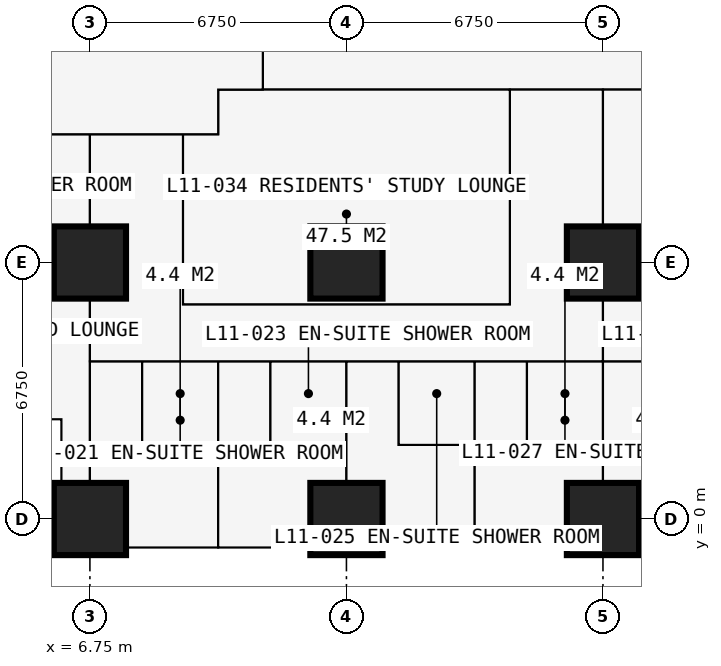
"""IFC4 building model, lengths in metres.
Left out: names, types, materials, properties, quantities, classifications, styles, units other than length and angle.
Written with IfcOpenShell. Run it as: python <this file> out.ifc"""

import sys

from ifc_helpers import new_model, si_unit, direction, frame, frame_2d, origin, origin_2d, place, context, subcontext, project, spatial, rectangle, extrude, element, fill, save


model = new_model("IFC4")
c1 = context("Model", 3, precision=1e-05, world=origin(), true_north=direction((0.0, 1.0)))
c2 = subcontext(c1, "Body", "Model", "MODEL_VIEW")
j1 = project(units=[si_unit("LENGTHUNIT", "METRE"), si_unit("PLANEANGLEUNIT", "RADIAN")], contexts=[c1])
p1 = place(None, origin())
s1 = spatial("IfcSite", under=j1, at=p1, CompositionType="ELEMENT")
p2 = place(p1, origin())
s2 = spatial("IfcBuilding", under=s1, at=p2, CompositionType="ELEMENT")
p3 = place(p2, frame((0.0, 0.0, 43.2)))
s3 = spatial("IfcBuildingStorey", under=s2, at=p3, CompositionType="ELEMENT", Elevation=43.2)
for number, where, z_axis, x_axis in (
    (1, (6.75, 0.0, 0.0), (0.0, 0.0, 1.0), (1.0, 0.0, 0.0)),
    (2, (6.75, 6.75, 0.0), (0.0, 0.0, 1.0), (1.0, 0.0, 0.0)),
    (3, (13.5, 0.0, 0.0), (0.0, 0.0, 1.0), (1.0, 0.0, 0.0)),
    (4, (13.5, 6.75, 0.0), (0.0, 0.0, 1.0), (1.0, 0.0, 0.0)),
    (5, (20.25, 0.0, 0.0), (0.0, 0.0, 1.0), (1.0, 0.0, 0.0)),
    (6, (20.25, 6.75, 0.0), (0.0, 0.0, 1.0), (1.0, 0.0, 0.0)),
):
    element("IfcColumn", number, at=place(p3, frame(where, z_axis=z_axis, x_axis=x_axis)), inside=s3, PredefinedType="COLUMN", context=c2, shape_type="SweptSolid", body=[
        extrude(rectangle(XDim=1.9, YDim=1.9, at=origin_2d()), origin(), (0.0, 0.0, 1.0), 3.6),
    ])
p4 = place(p3, frame((2.625, 2.625, 0.0), z_axis=(0.0, 0.0, 1.0), x_axis=(1.0, 0.0, 0.0)))
e7 = element("IfcWall", 7, at=p4, inside=s3, PredefinedType="SOLIDWALL", context=c2, shape_type="SweptSolid", body=[
    extrude(rectangle(XDim=3.375, YDim=0.3, at=frame_2d((1.688, 0.0))), origin(), (0.0, 0.0, 1.0), 3.375),
])
p5 = place(p4, frame((0.788, 0.0, 0.6)))
e8 = element("IfcOpeningElement", 8, at=p5, cuts=e7, PredefinedType="OPENING", context=c2, shape_type="SweptSolid", body=[
    extrude(rectangle(XDim=1.8, YDim=2.1, at=frame_2d((0.9, 1.05))), frame((0.0, 0.16, 0.0), z_axis=(0.0, -1.0, 0.0), x_axis=(1.0, 0.0, 0.0)), (0.0, 0.0, 1.0), 0.32),
])
p6 = place(p3, frame((6.0, 2.625, 0.0), z_axis=(0.0, 0.0, 1.0), x_axis=(0.0, -1.0, 0.0)))
e9 = element("IfcWall", 9, at=p6, inside=s3, PredefinedType="SOLIDWALL", context=c2, shape_type="SweptSolid", body=[
    extrude(rectangle(XDim=3.375, YDim=0.3, at=frame_2d((1.688, 0.0))), origin(), (0.0, 0.0, 1.0), 3.375),
])
p7 = place(p6, frame((0.317, 0.0, 0.9)))
e10 = element("IfcOpeningElement", 10, at=p7, cuts=e9, PredefinedType="OPENING", context=c2, shape_type="SweptSolid", body=[
    extrude(rectangle(XDim=1.2, YDim=1.8, at=frame_2d((0.6, 0.9))), frame((0.0, 0.16, 0.0), z_axis=(0.0, -1.0, 0.0), x_axis=(1.0, 0.0, 0.0)), (0.0, 0.0, 1.0), 0.32),
])
p8 = place(p3, frame((27.0, -0.75, 0.0), z_axis=(0.0, 0.0, 1.0), x_axis=(-1.0, 0.0, 0.0)))
e11 = element("IfcWall", 11, at=p8, inside=s3, PredefinedType="SOLIDWALL", context=c2, shape_type="SweptSolid", body=[
    extrude(rectangle(XDim=6.75, YDim=0.15, at=frame_2d((3.375, 0.0))), origin(), (0.0, 0.0, 1.0), 3.375),
])
p9 = place(p8, frame((0.996, 0.0, 0.0)))
e12 = element("IfcOpeningElement", 12, at=p9, cuts=e11, PredefinedType="OPENING", context=c2, shape_type="SweptSolid", body=[
    extrude(rectangle(XDim=1.0, YDim=2.2, at=frame_2d((0.5, 1.1))), frame((0.0, 0.085, 0.0), z_axis=(0.0, -1.0, 0.0), x_axis=(1.0, 0.0, 0.0)), (0.0, 0.0, 1.0), 0.17),
])
p10 = place(p8, frame((2.042, 0.0, 0.9)))
e13 = element("IfcOpeningElement", 13, at=p10, cuts=e11, PredefinedType="OPENING", context=c2, shape_type="SweptSolid", body=[
    extrude(rectangle(XDim=1.2, YDim=1.8, at=frame_2d((0.6, 0.9))), frame((0.0, 0.085, 0.0), z_axis=(0.0, -1.0, 0.0), x_axis=(1.0, 0.0, 0.0)), (0.0, 0.0, 1.0), 0.17),
])
p11 = place(p8, frame((4.754, 0.0, 0.0)))
e14 = element("IfcOpeningElement", 14, at=p11, cuts=e11, PredefinedType="OPENING", context=c2, shape_type="SweptSolid", body=[
    extrude(rectangle(XDim=1.0, YDim=2.2, at=frame_2d((0.5, 1.1))), frame((0.0, 0.085, 0.0), z_axis=(0.0, -1.0, 0.0), x_axis=(1.0, 0.0, 0.0)), (0.0, 0.0, 1.0), 0.17),
])
p12 = place(p8, frame((3.508, 0.0, 0.9)))
e15 = element("IfcOpeningElement", 15, at=p12, cuts=e11, PredefinedType="OPENING", context=c2, shape_type="SweptSolid", body=[
    extrude(rectangle(XDim=1.2, YDim=1.8, at=frame_2d((0.6, 0.9))), frame((0.0, 0.085, 0.0), z_axis=(0.0, -1.0, 0.0), x_axis=(1.0, 0.0, 0.0)), (0.0, 0.0, 1.0), 0.17),
])
p13 = place(p3, frame((-0.734, 10.125, 0.0), z_axis=(0.0, 0.0, 1.0), x_axis=(1.0, 0.0, 0.0)))
e16 = element("IfcWall", 16, at=p13, inside=s3, PredefinedType="PARTITIONING", context=c2, shape_type="SweptSolid", body=[
    extrude(rectangle(XDim=10.859, YDim=0.15, at=frame_2d((5.429, 0.0))), origin(), (0.0, 0.0, 1.0), 3.375),
])
p14 = place(p13, frame((5.134, 0.0, 0.0)))
e17 = element("IfcOpeningElement", 17, at=p14, cuts=e16, PredefinedType="OPENING", context=c2, shape_type="SweptSolid", body=[
    extrude(rectangle(XDim=1.0, YDim=2.2, at=frame_2d((0.5, 1.1))), frame((0.0, 0.085, 0.0), z_axis=(0.0, -1.0, 0.0), x_axis=(1.0, 0.0, 0.0)), (0.0, 0.0, 1.0), 0.17),
])
p15 = place(p3, frame((6.75, -0.734, 0.0), z_axis=(0.0, 0.0, 1.0), x_axis=(0.0, 1.0, 0.0)))
e18 = element("IfcWall", 18, at=p15, inside=s3, PredefinedType="PARTITIONING", context=c2, shape_type="SweptSolid", body=[
    extrude(rectangle(XDim=10.859, YDim=0.15, at=frame_2d((5.429, 0.0))), origin(), (0.0, 0.0, 1.0), 2.877),
])
p16 = place(p3, frame((6.75, 4.15, 0.0), z_axis=(0.0, 0.0, 1.0), x_axis=(1.0, 0.0, 0.0)))
e19 = element("IfcWall", 19, at=p16, inside=s3, PredefinedType="PARTITIONING", context=c2, shape_type="SweptSolid", body=[
    extrude(rectangle(XDim=23.625, YDim=0.1, at=frame_2d((11.812, 0.0))), origin(), (0.0, 0.0, 1.0), 3.375),
])
p17 = place(p16, frame((0.2, 0.0, 0.0)))
e20 = element("IfcOpeningElement", 20, at=p17, cuts=e19, PredefinedType="OPENING", context=c2, shape_type="SweptSolid", body=[
    extrude(rectangle(XDim=0.95, YDim=2.2, at=frame_2d((0.475, 1.1))), frame((0.0, 0.06, 0.0), z_axis=(0.0, -1.0, 0.0), x_axis=(1.0, 0.0, 0.0)), (0.0, 0.0, 1.0), 0.12),
])
p18 = place(p16, frame((3.625, 0.0, 0.0)))
e21 = element("IfcOpeningElement", 21, at=p18, cuts=e19, PredefinedType="OPENING", context=c2, shape_type="SweptSolid", body=[
    extrude(rectangle(XDim=0.95, YDim=2.2, at=frame_2d((0.475, 1.1))), frame((0.0, 0.06, 0.0), z_axis=(0.0, -1.0, 0.0), x_axis=(1.0, 0.0, 0.0)), (0.0, 0.0, 1.0), 0.12),
])
p19 = place(p16, frame((7.0, 0.0, 0.0)))
e22 = element("IfcOpeningElement", 22, at=p19, cuts=e19, PredefinedType="OPENING", context=c2, shape_type="SweptSolid", body=[
    extrude(rectangle(XDim=0.95, YDim=2.2, at=frame_2d((0.475, 1.1))), frame((0.0, 0.06, 0.0), z_axis=(0.0, -1.0, 0.0), x_axis=(1.0, 0.0, 0.0)), (0.0, 0.0, 1.0), 0.12),
])
p20 = place(p16, frame((10.375, 0.0, 0.0)))
e23 = element("IfcOpeningElement", 23, at=p20, cuts=e19, PredefinedType="OPENING", context=c2, shape_type="SweptSolid", body=[
    extrude(rectangle(XDim=0.95, YDim=2.2, at=frame_2d((0.475, 1.1))), frame((0.0, 0.06, 0.0), z_axis=(0.0, -1.0, 0.0), x_axis=(1.0, 0.0, 0.0)), (0.0, 0.0, 1.0), 0.12),
])
p21 = place(p16, frame((18.475, 0.0, 0.0)))
e24 = element("IfcOpeningElement", 24, at=p21, cuts=e19, PredefinedType="OPENING", context=c2, shape_type="SweptSolid", body=[
    extrude(rectangle(XDim=0.95, YDim=2.2, at=frame_2d((0.475, 1.1))), frame((0.0, 0.06, 0.0), z_axis=(0.0, -1.0, 0.0), x_axis=(1.0, 0.0, 0.0)), (0.0, 0.0, 1.0), 0.12),
])
p22 = place(p16, frame((13.7, 0.0, 0.0)))
e25 = element("IfcOpeningElement", 25, at=p22, cuts=e19, PredefinedType="OPENING", context=c2, shape_type="SweptSolid", body=[
    extrude(rectangle(XDim=0.95, YDim=2.2, at=frame_2d((0.475, 1.1))), frame((0.0, 0.06, 0.0), z_axis=(0.0, -1.0, 0.0), x_axis=(1.0, 0.0, 0.0)), (0.0, 0.0, 1.0), 0.12),
])
p23 = place(p3, frame((8.125, 1.95, 0.0), z_axis=(0.0, 0.0, 1.0), x_axis=(0.0, 1.0, 0.0)))
e26 = element("IfcWall", 26, at=p23, inside=s3, PredefinedType="PARTITIONING", context=c2, shape_type="SweptSolid", body=[
    extrude(rectangle(XDim=2.2, YDim=0.1, at=frame_2d((1.1, 0.0))), origin(), (0.0, 0.0, 1.0), 3.375),
])
p24 = place(p23, frame((0.65, 0.0, 0.0)))
e27 = element("IfcOpeningElement", 27, at=p24, cuts=e26, PredefinedType="OPENING", context=c2, shape_type="SweptSolid", body=[
    extrude(rectangle(XDim=0.9, YDim=2.2, at=frame_2d((0.45, 1.1))), frame((0.0, 0.06, 0.0), z_axis=(0.0, -1.0, 0.0), x_axis=(1.0, 0.0, 0.0)), (0.0, 0.0, 1.0), 0.12),
])
p25 = place(p3, frame((8.125, 1.95, 0.0), z_axis=(0.0, 0.0, 1.0), x_axis=(1.0, 0.0, 0.0)))
e28 = element("IfcWall", 28, at=p25, inside=s3, PredefinedType="PARTITIONING", context=c2, shape_type="SweptSolid", body=[
    extrude(rectangle(XDim=2.0, YDim=0.1, at=frame_2d((1.0, 0.0))), origin(), (0.0, 0.0, 1.0), 3.375),
])
p26 = place(p3, frame((9.2, 5.65, 0.0), z_axis=(0.0, 0.0, 1.0), x_axis=(0.0, 1.0, 0.0)))
e29 = element("IfcWall", 29, at=p26, inside=s3, PredefinedType="PARTITIONING", context=c2, shape_type="SweptSolid", body=[
    extrude(rectangle(XDim=4.475, YDim=0.15, at=frame_2d((2.238, 0.0))), origin(), (0.0, 0.0, 1.0), 3.375),
])
p27 = place(p3, frame((9.2, 5.65, 0.0), z_axis=(0.0, 0.0, 1.0), x_axis=(1.0, 0.0, 0.0)))
e30 = element("IfcWall", 30, at=p27, inside=s3, PredefinedType="PARTITIONING", context=c2, shape_type="SweptSolid", body=[
    extrude(rectangle(XDim=8.6, YDim=0.15, at=frame_2d((4.3, 0.0))), origin(), (0.0, 0.0, 1.0), 3.375),
])
p28 = place(p3, frame((10.125, -0.734, 0.0), z_axis=(0.0, 0.0, 1.0), x_axis=(0.0, 1.0, 0.0)))
e31 = element("IfcWall", 31, at=p28, inside=s3, PredefinedType="PARTITIONING", context=c2, shape_type="SweptSolid", body=[
    extrude(rectangle(XDim=4.884, YDim=0.175, at=frame_2d((2.442, 0.0))), origin(), (0.0, 0.0, 1.0), 3.375),
])
p29 = place(p3, frame((10.125, 10.125, 0.0), z_axis=(0.0, 0.0, 1.0), x_axis=(0.0, 1.0, 0.0)))
e32 = element("IfcWall", 32, at=p29, inside=s3, PredefinedType="PARTITIONING", context=c2, shape_type="SweptSolid", body=[
    extrude(rectangle(XDim=1.175, YDim=0.15, at=frame_2d((0.587, 0.0))), origin(), (0.0, 0.0, 1.0), 3.375),
])
p30 = place(p3, frame((10.125, 11.3, 0.0), z_axis=(0.0, 0.0, 1.0), x_axis=(1.0, 0.0, 0.0)))
e33 = element("IfcWall", 33, at=p30, inside=s3, PredefinedType="PARTITIONING", context=c2, shape_type="SweptSolid", body=[
    extrude(rectangle(XDim=20.675, YDim=0.15, at=frame_2d((10.337, 0.0))), origin(), (0.0, 0.0, 1.0), 3.375),
])
p31 = place(p30, frame((8.375, 0.0, 0.0)))
e34 = element("IfcOpeningElement", 34, at=p31, cuts=e33, PredefinedType="OPENING", context=c2, shape_type="SweptSolid", body=[
    extrude(rectangle(XDim=1.0, YDim=2.2, at=frame_2d((0.5, 1.1))), frame((0.0, 0.085, 0.0), z_axis=(0.0, -1.0, 0.0), x_axis=(1.0, 0.0, 0.0)), (0.0, 0.0, 1.0), 0.17),
])
p32 = place(p30, frame((10.975, 0.0, 0.0)))
e35 = element("IfcOpeningElement", 35, at=p32, cuts=e33, PredefinedType="OPENING", context=c2, shape_type="SweptSolid", body=[
    extrude(rectangle(XDim=1.0, YDim=2.2, at=frame_2d((0.5, 1.1))), frame((0.0, 0.085, 0.0), z_axis=(0.0, -1.0, 0.0), x_axis=(1.0, 0.0, 0.0)), (0.0, 0.0, 1.0), 0.17),
])
p33 = place(p30, frame((3.925, 0.0, 0.0)))
e36 = element("IfcOpeningElement", 36, at=p33, cuts=e33, PredefinedType="OPENING", context=c2, shape_type="SweptSolid", body=[
    extrude(rectangle(XDim=0.95, YDim=2.2, at=frame_2d((0.475, 1.1))), frame((0.0, 0.085, 0.0), z_axis=(0.0, -1.0, 0.0), x_axis=(1.0, 0.0, 0.0)), (0.0, 0.0, 1.0), 0.17),
])
p34 = place(p3, frame((11.3, 11.3, 0.0), z_axis=(0.0, 0.0, 1.0), x_axis=(0.0, 1.0, 0.0)))
e37 = element("IfcWall", 37, at=p34, inside=s3, PredefinedType="PARTITIONING", context=c2, shape_type="SweptSolid", body=[
    extrude(rectangle(XDim=19.075, YDim=0.15, at=frame_2d((9.538, 0.0))), origin(), (0.0, 0.0, 1.0), 3.375),
])
p35 = place(p34, frame((12.875, 0.0, 0.0)))
e38 = element("IfcOpeningElement", 38, at=p35, cuts=e37, PredefinedType="OPENING", context=c2, shape_type="SweptSolid", body=[
    extrude(rectangle(XDim=1.0, YDim=2.2, at=frame_2d((0.5, 1.1))), frame((0.0, 0.085, 0.0), z_axis=(0.0, -1.0, 0.0), x_axis=(1.0, 0.0, 0.0)), (0.0, 0.0, 1.0), 0.17),
])
p36 = place(p34, frame((10.438, 0.0, 0.0)))
e39 = element("IfcOpeningElement", 39, at=p36, cuts=e37, PredefinedType="OPENING", context=c2, shape_type="SweptSolid", body=[
    extrude(rectangle(XDim=1.0, YDim=2.2, at=frame_2d((0.5, 1.1))), frame((0.0, 0.085, 0.0), z_axis=(0.0, -1.0, 0.0), x_axis=(1.0, 0.0, 0.0)), (0.0, 0.0, 1.0), 0.17),
])
p37 = place(p34, frame((15.675, 0.0, 0.0)))
e40 = element("IfcOpeningElement", 40, at=p37, cuts=e37, PredefinedType="OPENING", context=c2, shape_type="SweptSolid", body=[
    extrude(rectangle(XDim=0.95, YDim=2.2, at=frame_2d((0.475, 1.1))), frame((0.0, 0.085, 0.0), z_axis=(0.0, -1.0, 0.0), x_axis=(1.0, 0.0, 0.0)), (0.0, 0.0, 1.0), 0.17),
])
p38 = place(p3, frame((11.5, 1.95, 0.0), z_axis=(0.0, 0.0, 1.0), x_axis=(0.0, 1.0, 0.0)))
e41 = element("IfcWall", 41, at=p38, inside=s3, PredefinedType="PARTITIONING", context=c2, shape_type="SweptSolid", body=[
    extrude(rectangle(XDim=2.2, YDim=0.1, at=frame_2d((1.1, 0.0))), origin(), (0.0, 0.0, 1.0), 3.375),
])
p39 = place(p38, frame((0.65, 0.0, 0.0)))
e42 = element("IfcOpeningElement", 42, at=p39, cuts=e41, PredefinedType="OPENING", context=c2, shape_type="SweptSolid", body=[
    extrude(rectangle(XDim=0.9, YDim=2.2, at=frame_2d((0.45, 1.1))), frame((0.0, 0.06, 0.0), z_axis=(0.0, -1.0, 0.0), x_axis=(1.0, 0.0, 0.0)), (0.0, 0.0, 1.0), 0.12),
])
p40 = place(p3, frame((11.5, 1.95, 0.0), z_axis=(0.0, 0.0, 1.0), x_axis=(1.0, 0.0, 0.0)))
e43 = element("IfcWall", 43, at=p40, inside=s3, PredefinedType="PARTITIONING", context=c2, shape_type="SweptSolid", body=[
    extrude(rectangle(XDim=2.0, YDim=0.1, at=frame_2d((1.0, 0.0))), origin(), (0.0, 0.0, 1.0), 3.375),
])
p41 = place(p3, frame((13.5, -0.734, 0.0), z_axis=(0.0, 0.0, 1.0), x_axis=(0.0, 1.0, 0.0)))
e44 = element("IfcWall", 44, at=p41, inside=s3, PredefinedType="PARTITIONING", context=c2, shape_type="SweptSolid", body=[
    extrude(rectangle(XDim=4.884, YDim=0.175, at=frame_2d((2.442, 0.0))), origin(), (0.0, 0.0, 1.0), 2.61),
])
p42 = place(p3, frame((14.875, 1.95, 0.0), z_axis=(0.0, 0.0, 1.0), x_axis=(0.0, 1.0, 0.0)))
e45 = element("IfcWall", 45, at=p42, inside=s3, PredefinedType="PARTITIONING", context=c2, shape_type="SweptSolid", body=[
    extrude(rectangle(XDim=2.2, YDim=0.1, at=frame_2d((1.1, 0.0))), origin(), (0.0, 0.0, 1.0), 3.375),
])
p43 = place(p42, frame((0.65, 0.0, 0.0)))
e46 = element("IfcOpeningElement", 46, at=p43, cuts=e45, PredefinedType="OPENING", context=c2, shape_type="SweptSolid", body=[
    extrude(rectangle(XDim=0.9, YDim=2.2, at=frame_2d((0.45, 1.1))), frame((0.0, 0.06, 0.0), z_axis=(0.0, -1.0, 0.0), x_axis=(1.0, 0.0, 0.0)), (0.0, 0.0, 1.0), 0.12),
])
p44 = place(p3, frame((14.875, 1.95, 0.0), z_axis=(0.0, 0.0, 1.0), x_axis=(1.0, 0.0, 0.0)))
e47 = element("IfcWall", 47, at=p44, inside=s3, PredefinedType="PARTITIONING", context=c2, shape_type="SweptSolid", body=[
    extrude(rectangle(XDim=2.0, YDim=0.1, at=frame_2d((1.0, 0.0))), origin(), (0.0, 0.0, 1.0), 3.375),
])
p45 = place(p3, frame((16.875, -0.734, 0.0), z_axis=(0.0, 0.0, 1.0), x_axis=(0.0, 1.0, 0.0)))
e48 = element("IfcWall", 48, at=p45, inside=s3, PredefinedType="PARTITIONING", context=c2, shape_type="SweptSolid", body=[
    extrude(rectangle(XDim=4.884, YDim=0.175, at=frame_2d((2.442, 0.0))), origin(), (0.0, 0.0, 1.0), 3.375),
])
p46 = place(p3, frame((17.8, 5.65, 0.0), z_axis=(0.0, 0.0, 1.0), x_axis=(0.0, 1.0, 0.0)))
e49 = element("IfcWall", 49, at=p46, inside=s3, PredefinedType="PARTITIONING", context=c2, shape_type="SweptSolid", body=[
    extrude(rectangle(XDim=5.65, YDim=0.15, at=frame_2d((2.825, 0.0))), origin(), (0.0, 0.0, 1.0), 3.375),
])
p47 = place(p3, frame((18.25, 1.95, 0.0), z_axis=(0.0, 0.0, 1.0), x_axis=(0.0, 1.0, 0.0)))
e50 = element("IfcWall", 50, at=p47, inside=s3, PredefinedType="PARTITIONING", context=c2, shape_type="SweptSolid", body=[
    extrude(rectangle(XDim=2.2, YDim=0.1, at=frame_2d((1.1, 0.0))), origin(), (0.0, 0.0, 1.0), 3.375),
])
p48 = place(p47, frame((0.65, 0.0, 0.0)))
e51 = element("IfcOpeningElement", 51, at=p48, cuts=e50, PredefinedType="OPENING", context=c2, shape_type="SweptSolid", body=[
    extrude(rectangle(XDim=0.9, YDim=2.2, at=frame_2d((0.45, 1.1))), frame((0.0, 0.06, 0.0), z_axis=(0.0, -1.0, 0.0), x_axis=(1.0, 0.0, 0.0)), (0.0, 0.0, 1.0), 0.12),
])
p49 = place(p3, frame((18.25, 1.95, 0.0), z_axis=(0.0, 0.0, 1.0), x_axis=(1.0, 0.0, 0.0)))
e52 = element("IfcWall", 52, at=p49, inside=s3, PredefinedType="PARTITIONING", context=c2, shape_type="SweptSolid", body=[
    extrude(rectangle(XDim=2.0, YDim=0.1, at=frame_2d((1.0, 0.0))), origin(), (0.0, 0.0, 1.0), 3.375),
])
p50 = place(p3, frame((20.25, -0.734, 0.0), z_axis=(0.0, 0.0, 1.0), x_axis=(0.0, 1.0, 0.0)))
e53 = element("IfcWall", 53, at=p50, inside=s3, PredefinedType="PARTITIONING", context=c2, shape_type="SweptSolid", body=[
    extrude(rectangle(XDim=12.034, YDim=0.15, at=frame_2d((6.017, 0.0))), origin(), (0.0, 0.0, 1.0), 2.61),
])
p51 = place(p7, origin())
e54 = element("IfcWindow", 54, at=p51, inside=s3, PartitioningType="SINGLE_PANEL", PredefinedType="WINDOW", context=c2, shape_type="SweptSolid", body=[
    extrude(rectangle(XDim=1.2, YDim=1.8, at=frame_2d((0.6, 0.9))), frame((0.0, 0.03, 0.0), z_axis=(0.0, -1.0, 0.0), x_axis=(1.0, 0.0, 0.0)), (0.0, 0.0, 1.0), 0.06),
])
fill(e10, e54)
p52 = place(p11, origin())
e55 = element("IfcDoor", 55, at=p52, inside=s3, OperationType="SINGLE_SWING_RIGHT", PredefinedType="DOOR", context=c2, shape_type="SweptSolid", body=[
    extrude(rectangle(XDim=1.0, YDim=2.2, at=frame_2d((0.5, 1.1))), frame((0.0, 0.025, 0.0), z_axis=(0.0, -1.0, 0.0), x_axis=(1.0, 0.0, 0.0)), (0.0, 0.0, 1.0), 0.05),
])
fill(e14, e55)
p53 = place(p17, origin())
e56 = element("IfcDoor", 56, at=p53, inside=s3, OperationType="SINGLE_SWING_LEFT", PredefinedType="DOOR", context=c2, shape_type="SweptSolid", body=[
    extrude(rectangle(XDim=0.95, YDim=2.2, at=frame_2d((0.475, 1.1))), frame((0.0, 0.025, 0.0), z_axis=(0.0, -1.0, 0.0), x_axis=(1.0, 0.0, 0.0)), (0.0, 0.0, 1.0), 0.05),
])
fill(e20, e56)
p54 = place(p24, origin())
e57 = element("IfcDoor", 57, at=p54, inside=s3, OperationType="SINGLE_SWING_RIGHT", PredefinedType="DOOR", context=c2, shape_type="SweptSolid", body=[
    extrude(rectangle(XDim=0.9, YDim=2.2, at=frame_2d((0.45, 1.1))), frame((0.0, 0.025, 0.0), z_axis=(0.0, -1.0, 0.0), x_axis=(1.0, 0.0, 0.0)), (0.0, 0.0, 1.0), 0.05),
])
fill(e27, e57)
p55 = place(p18, origin())
e58 = element("IfcDoor", 58, at=p55, inside=s3, OperationType="SINGLE_SWING_LEFT", PredefinedType="DOOR", context=c2, shape_type="SweptSolid", body=[
    extrude(rectangle(XDim=0.95, YDim=2.2, at=frame_2d((0.475, 1.1))), frame((0.0, 0.025, 0.0), z_axis=(0.0, -1.0, 0.0), x_axis=(1.0, 0.0, 0.0)), (0.0, 0.0, 1.0), 0.05),
])
fill(e21, e58)
p56 = place(p39, origin())
e59 = element("IfcDoor", 59, at=p56, inside=s3, OperationType="SINGLE_SWING_RIGHT", PredefinedType="DOOR", context=c2, shape_type="SweptSolid", body=[
    extrude(rectangle(XDim=0.9, YDim=2.2, at=frame_2d((0.45, 1.1))), frame((0.0, 0.025, 0.0), z_axis=(0.0, -1.0, 0.0), x_axis=(1.0, 0.0, 0.0)), (0.0, 0.0, 1.0), 0.05),
])
fill(e42, e59)
p57 = place(p19, origin())
e60 = element("IfcDoor", 60, at=p57, inside=s3, OperationType="SINGLE_SWING_LEFT", PredefinedType="DOOR", context=c2, shape_type="SweptSolid", body=[
    extrude(rectangle(XDim=0.95, YDim=2.2, at=frame_2d((0.475, 1.1))), frame((0.0, 0.025, 0.0), z_axis=(0.0, -1.0, 0.0), x_axis=(1.0, 0.0, 0.0)), (0.0, 0.0, 1.0), 0.05),
])
fill(e22, e60)
p58 = place(p43, origin())
e61 = element("IfcDoor", 61, at=p58, inside=s3, OperationType="SINGLE_SWING_RIGHT", PredefinedType="DOOR", context=c2, shape_type="SweptSolid", body=[
    extrude(rectangle(XDim=0.9, YDim=2.2, at=frame_2d((0.45, 1.1))), frame((0.0, 0.025, 0.0), z_axis=(0.0, -1.0, 0.0), x_axis=(1.0, 0.0, 0.0)), (0.0, 0.0, 1.0), 0.05),
])
fill(e46, e61)
p59 = place(p20, origin())
e62 = element("IfcDoor", 62, at=p59, inside=s3, OperationType="SINGLE_SWING_LEFT", PredefinedType="DOOR", context=c2, shape_type="SweptSolid", body=[
    extrude(rectangle(XDim=0.95, YDim=2.2, at=frame_2d((0.475, 1.1))), frame((0.0, 0.025, 0.0), z_axis=(0.0, -1.0, 0.0), x_axis=(1.0, 0.0, 0.0)), (0.0, 0.0, 1.0), 0.05),
])
fill(e23, e62)
p60 = place(p48, origin())
e63 = element("IfcDoor", 63, at=p60, inside=s3, OperationType="SINGLE_SWING_RIGHT", PredefinedType="DOOR", context=c2, shape_type="SweptSolid", body=[
    extrude(rectangle(XDim=0.9, YDim=2.2, at=frame_2d((0.45, 1.1))), frame((0.0, 0.025, 0.0), z_axis=(0.0, -1.0, 0.0), x_axis=(1.0, 0.0, 0.0)), (0.0, 0.0, 1.0), 0.05),
])
fill(e51, e63)
p61 = place(p31, origin())
e64 = element("IfcDoor", 64, at=p61, inside=s3, OperationType="SINGLE_SWING_LEFT", PredefinedType="DOOR", context=c2, shape_type="SweptSolid", body=[
    extrude(rectangle(XDim=1.0, YDim=2.2, at=frame_2d((0.5, 1.1))), frame((0.0, 0.025, 0.0), z_axis=(0.0, -1.0, 0.0), x_axis=(1.0, 0.0, 0.0)), (0.0, 0.0, 1.0), 0.05),
])
fill(e34, e64)
p62 = place(p22, origin())
e65 = element("IfcDoor", 65, at=p62, inside=s3, OperationType="SINGLE_SWING_LEFT", PredefinedType="DOOR", context=c2, shape_type="SweptSolid", body=[
    extrude(rectangle(XDim=0.95, YDim=2.2, at=frame_2d((0.475, 1.1))), frame((0.0, 0.025, 0.0), z_axis=(0.0, -1.0, 0.0), x_axis=(1.0, 0.0, 0.0)), (0.0, 0.0, 1.0), 0.05),
])
fill(e25, e65)
p63 = place(p32, origin())
e66 = element("IfcDoor", 66, at=p63, inside=s3, OperationType="SINGLE_SWING_LEFT", PredefinedType="DOOR", context=c2, shape_type="SweptSolid", body=[
    extrude(rectangle(XDim=1.0, YDim=2.2, at=frame_2d((0.5, 1.1))), frame((0.0, 0.025, 0.0), z_axis=(0.0, -1.0, 0.0), x_axis=(1.0, 0.0, 0.0)), (0.0, 0.0, 1.0), 0.05),
])
fill(e35, e66)
p64 = place(p33, origin())
e67 = element("IfcDoor", 67, at=p64, inside=s3, OperationType="SINGLE_SWING_LEFT", PredefinedType="DOOR", context=c2, shape_type="SweptSolid", body=[
    extrude(rectangle(XDim=0.95, YDim=2.2, at=frame_2d((0.475, 1.1))), frame((0.0, 0.025, 0.0), z_axis=(0.0, -1.0, 0.0), x_axis=(1.0, 0.0, 0.0)), (0.0, 0.0, 1.0), 0.05),
])
fill(e36, e67)
save(model, sys.argv[1])
